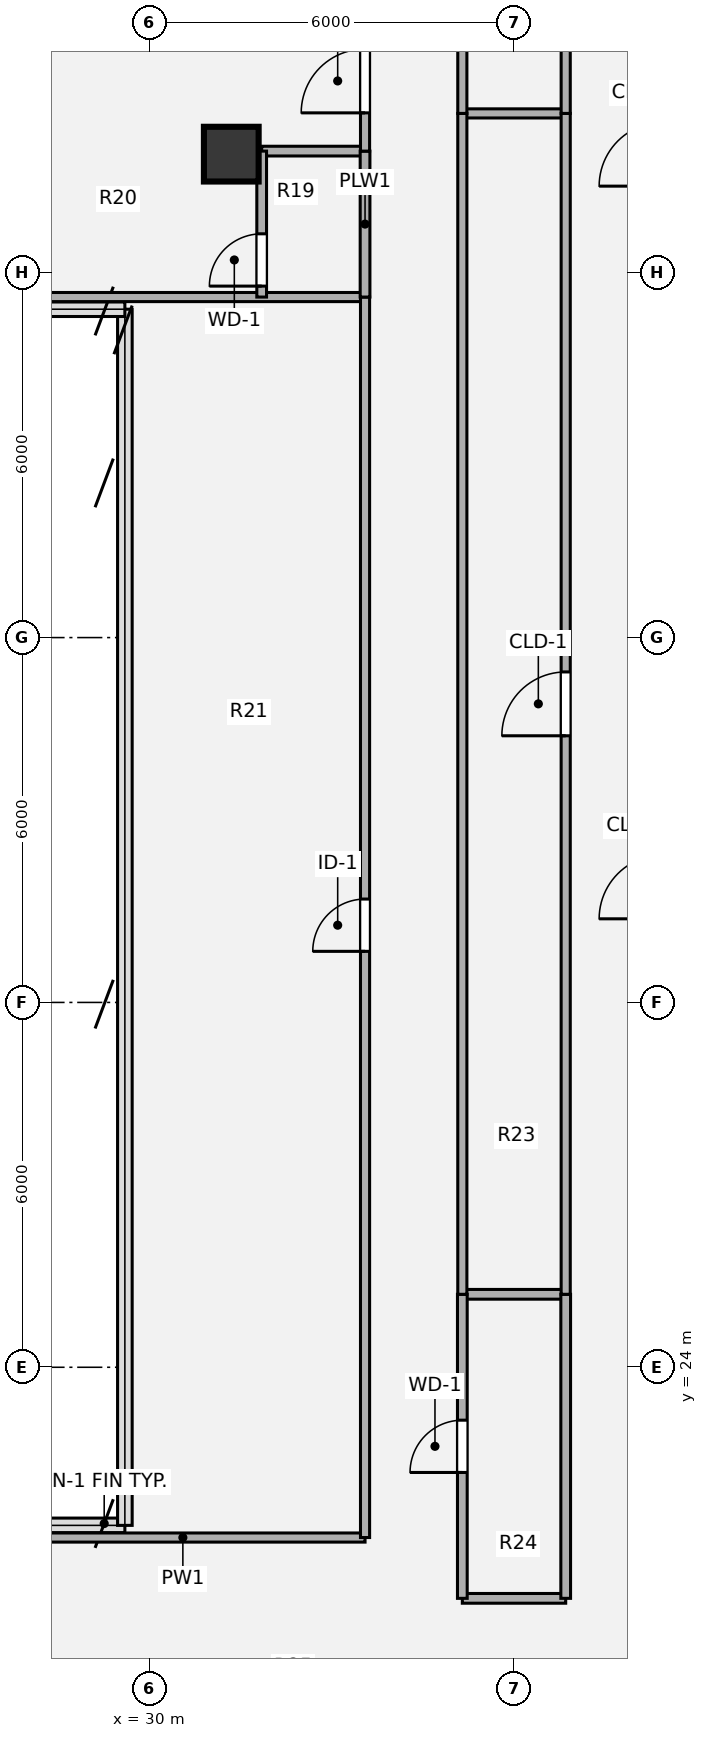
"""IFC4 building model, lengths in metres.
Left out: names, types, materials, properties, quantities, classifications, styles, units other than length and angle.
Written with IfcOpenShell. Run it as: python <this file> out.ifc"""

import sys

from ifc_helpers import new_model, si_unit, direction, frame, frame_2d, origin, origin_2d, place, context, subcontext, project, spatial, rectangle, hollow_circle, extrude, source, transform, mapped, element, fill, save


model = new_model("IFC4")
c1 = context("Model", 3, precision=1e-05, world=origin(), true_north=direction((0.0, 1.0)))
c2 = subcontext(c1, "Body", "Model", "MODEL_VIEW")
j1 = project(units=[si_unit("LENGTHUNIT", "METRE"), si_unit("PLANEANGLEUNIT", "RADIAN")], contexts=[c1])
p1 = place(None, origin())
s1 = spatial("IfcSite", under=j1, at=p1, CompositionType="ELEMENT")
p2 = place(p1, origin())
s2 = spatial("IfcBuilding", under=s1, at=p2, CompositionType="ELEMENT")
p3 = place(p2, frame((0.0, 0.0, 268.38)))
s3 = spatial("IfcBuildingStorey", under=s2, at=p3, CompositionType="ELEMENT", Elevation=268.38)
m1 = source(origin(), c2, "Body", "SweptSolid", [
    extrude(hollow_circle(Radius=0.45, WallThickness=0.032, at=origin_2d()), origin(), (0.0, 0.0, 1.0), 3.78),
])
p4 = place(p3, frame((31.35, 43.95, 0.0), z_axis=(0.0, 0.0, 1.0), x_axis=(1.0, 0.0, 0.0)))
e1 = element("IfcColumn", 1, at=p4, inside=s3, PredefinedType="COLUMN", context=c2, shape_type="MappedRepresentation", body=[
    mapped(m1, transform((0.0, 0.0, 0.0), x_axis=(1.0, 0.0, 0.0), y_axis=(0.0, 1.0, 0.0), z_axis=(0.0, 0.0, 1.0), scale=1.0)),
])
p5 = place(p3, frame((35.15, 20.2, 0.0), z_axis=(0.0, 0.0, 1.0), x_axis=(1.0, 0.0, 0.0)))
e2 = element("IfcWall", 2, at=p5, inside=s3, PredefinedType="PLUMBINGWALL", context=c2, shape_type="SweptSolid", body=[
    extrude(rectangle(XDim=1.7, YDim=0.16, at=frame_2d((0.85, 0.0))), origin(), (0.0, 0.0, 1.0), 3.5),
])
p6 = place(p3, frame((27.558, 21.2, 0.0), z_axis=(0.0, 0.0, 1.0), x_axis=(1.0, 0.0, 0.0)))
e3 = element("IfcWall", 3, at=p6, inside=s3, PredefinedType="PARTITIONING", context=c2, shape_type="SweptSolid", body=[
    extrude(rectangle(XDim=5.992, YDim=0.15, at=frame_2d((2.996, 0.0))), origin(), (0.0, 0.0, 1.0), 3.5),
])
p7 = place(p3, frame((35.15, 25.2, 0.0), z_axis=(0.0, 0.0, 1.0), x_axis=(1.0, 0.0, 0.0)))
e4 = element("IfcWall", 4, at=p7, inside=s3, PredefinedType="PLUMBINGWALL", context=c2, shape_type="SweptSolid", body=[
    extrude(rectangle(XDim=1.7, YDim=0.16, at=frame_2d((0.85, 0.0))), origin(), (0.0, 0.0, 1.0), 3.5),
])
p8 = place(p3, frame((27.558, 41.6, 0.0), z_axis=(0.0, 0.0, 1.0), x_axis=(1.0, 0.0, 0.0)))
e5 = element("IfcWall", 5, at=p8, inside=s3, PredefinedType="PARTITIONING", context=c2, shape_type="SweptSolid", body=[
    extrude(rectangle(XDim=5.992, YDim=0.15, at=frame_2d((2.996, 0.0))), origin(), (0.0, 0.0, 1.0), 3.5),
])
p9 = place(p3, frame((31.85, 44.0, 0.0), z_axis=(0.0, 0.0, 1.0), x_axis=(1.0, 0.0, 0.0)))
e6 = element("IfcWall", 6, at=p9, inside=s3, PredefinedType="PLUMBINGWALL", context=c2, shape_type="SweptSolid", body=[
    extrude(rectangle(XDim=1.7, YDim=0.16, at=frame_2d((0.85, 0.0))), origin(), (0.0, 0.0, 1.0), 2.903),
])
p10 = place(p3, frame((35.15, 44.62, 0.0), z_axis=(0.0, 0.0, 1.0), x_axis=(1.0, 0.0, 0.0)))
e7 = element("IfcWall", 7, at=p10, inside=s3, PredefinedType="PARTITIONING", context=c2, shape_type="SweptSolid", body=[
    extrude(rectangle(XDim=1.7, YDim=0.15, at=frame_2d((0.85, 0.0))), origin(), (0.0, 0.0, 1.0), 3.259),
])
p11 = place(p3, frame((31.85, 41.6, 0.0), z_axis=(0.0, 0.0, 1.0), x_axis=(0.0, 1.0, 0.0)))
e8 = element("IfcWall", 8, at=p11, inside=s3, PredefinedType="PLUMBINGWALL", context=c2, shape_type="SweptSolid", body=[
    extrude(rectangle(XDim=2.4, YDim=0.16, at=frame_2d((1.2, 0.0))), origin(), (0.0, 0.0, 1.0), 3.5),
])
p12 = place(p11, frame((0.18, 0.0, 0.0)))
e9 = element("IfcOpeningElement", 9, at=p12, cuts=e8, PredefinedType="OPENING", context=c2, shape_type="SweptSolid", body=[
    extrude(rectangle(XDim=0.86, YDim=2.1, at=origin_2d()), frame((0.43, 0.09, 1.05), z_axis=(0.0, -1.0, 0.0), x_axis=(1.0, 0.0, 0.0)), (0.0, 0.0, 1.0), 0.18),
])
p13 = place(p3, frame((33.55, 21.2, 0.0), z_axis=(0.0, 0.0, 1.0), x_axis=(0.0, 1.0, 0.0)))
e10 = element("IfcWall", 10, at=p13, inside=s3, PredefinedType="PARTITIONING", context=c2, shape_type="SweptSolid", body=[
    extrude(rectangle(XDim=20.4, YDim=0.15, at=frame_2d((10.2, 0.0))), origin(), (0.0, 0.0, 1.0), 3.5),
])
p14 = place(p13, frame((9.64, 0.0, 0.0)))
e11 = element("IfcOpeningElement", 11, at=p14, cuts=e10, PredefinedType="OPENING", context=c2, shape_type="SweptSolid", body=[
    extrude(rectangle(XDim=0.86, YDim=2.1, at=origin_2d()), frame((0.43, 0.085, 1.05), z_axis=(0.0, -1.0, 0.0), x_axis=(1.0, 0.0, 0.0)), (0.0, 0.0, 1.0), 0.17),
])
p15 = place(p3, frame((33.55, 41.6, 0.0), z_axis=(0.0, 0.0, 1.0), x_axis=(0.0, 1.0, 0.0)))
e12 = element("IfcWall", 12, at=p15, inside=s3, PredefinedType="PLUMBINGWALL", context=c2, shape_type="SweptSolid", body=[
    extrude(rectangle(XDim=2.4, YDim=0.16, at=frame_2d((1.2, 0.0))), origin(), (0.0, 0.0, 1.0), 3.5),
])
p16 = place(p3, frame((33.55, 44.0, 0.0), z_axis=(0.0, 0.0, 1.0), x_axis=(0.0, 1.0, 0.0)))
e13 = element("IfcWall", 13, at=p16, inside=s3, PredefinedType="PARTITIONING", context=c2, shape_type="SweptSolid", body=[
    extrude(rectangle(XDim=2.298, YDim=0.15, at=frame_2d((1.149, 0.0))), origin(), (0.0, 0.0, 1.0), 3.5),
])
p17 = place(p16, frame((0.629, 0.0, 0.0)))
e14 = element("IfcOpeningElement", 14, at=p17, cuts=e13, PredefinedType="OPENING", context=c2, shape_type="SweptSolid", body=[
    extrude(rectangle(XDim=1.05, YDim=2.1, at=origin_2d()), frame((0.525, 0.085, 1.05), z_axis=(0.0, -1.0, 0.0), x_axis=(1.0, 0.0, 0.0)), (0.0, 0.0, 1.0), 0.17),
])
p18 = place(p3, frame((35.15, 20.2, 0.0), z_axis=(0.0, 0.0, 1.0), x_axis=(0.0, 1.0, 0.0)))
e15 = element("IfcWall", 15, at=p18, inside=s3, PredefinedType="PLUMBINGWALL", context=c2, shape_type="SweptSolid", body=[
    extrude(rectangle(XDim=5.0, YDim=0.16, at=frame_2d((2.5, 0.0))), origin(), (0.0, 0.0, 1.0), 3.5),
])
p19 = place(p18, frame((2.07, 0.0, 0.0)))
e16 = element("IfcOpeningElement", 16, at=p19, cuts=e15, PredefinedType="OPENING", context=c2, shape_type="SweptSolid", body=[
    extrude(rectangle(XDim=0.86, YDim=2.1, at=origin_2d()), frame((0.43, 0.09, 1.05), z_axis=(0.0, -1.0, 0.0), x_axis=(1.0, 0.0, 0.0)), (0.0, 0.0, 1.0), 0.18),
])
p20 = place(p3, frame((35.15, 25.2, 0.0), z_axis=(0.0, 0.0, 1.0), x_axis=(0.0, 1.0, 0.0)))
e17 = element("IfcWall", 17, at=p20, inside=s3, PredefinedType="PARTITIONING", context=c2, shape_type="SweptSolid", body=[
    extrude(rectangle(XDim=19.42, YDim=0.15, at=frame_2d((9.71, 0.0))), origin(), (0.0, 0.0, 1.0), 3.5),
])
p21 = place(p3, frame((35.15, 44.62, 0.0), z_axis=(0.0, 0.0, 1.0), x_axis=(0.0, 1.0, 0.0)))
e18 = element("IfcWall", 18, at=p21, inside=s3, PredefinedType="PARTITIONING", context=c2, shape_type="SweptSolid", body=[
    extrude(rectangle(XDim=12.58, YDim=0.15, at=frame_2d((6.29, 0.0))), origin(), (0.0, 0.0, 1.0), 3.5),
])
p22 = place(p21, frame((5.83, 0.0, 0.0)))
e19 = element("IfcOpeningElement", 19, at=p22, cuts=e18, PredefinedType="OPENING", context=c2, shape_type="SweptSolid", body=[
    extrude(rectangle(XDim=0.86, YDim=2.1, at=origin_2d()), frame((0.43, 0.085, 1.05), z_axis=(0.0, -1.0, 0.0), x_axis=(1.0, 0.0, 0.0)), (0.0, 0.0, 1.0), 0.17),
])
p23 = place(p3, frame((36.85, 20.2, 0.0), z_axis=(0.0, 0.0, 1.0), x_axis=(0.0, 1.0, 0.0)))
e20 = element("IfcWall", 20, at=p23, inside=s3, PredefinedType="PLUMBINGWALL", context=c2, shape_type="SweptSolid", body=[
    extrude(rectangle(XDim=5.0, YDim=0.16, at=frame_2d((2.5, 0.0))), origin(), (0.0, 0.0, 1.0), 3.5),
])
p24 = place(p3, frame((36.85, 25.2, 0.0), z_axis=(0.0, 0.0, 1.0), x_axis=(0.0, 1.0, 0.0)))
e21 = element("IfcWall", 21, at=p24, inside=s3, PredefinedType="PARTITIONING", context=c2, shape_type="SweptSolid", body=[
    extrude(rectangle(XDim=19.42, YDim=0.15, at=frame_2d((9.71, 0.0))), origin(), (0.0, 0.0, 1.0), 3.5),
])
p25 = place(p24, frame((9.185, 0.0, 0.0)))
e22 = element("IfcOpeningElement", 22, at=p25, cuts=e21, PredefinedType="OPENING", context=c2, shape_type="SweptSolid", body=[
    extrude(rectangle(XDim=1.05, YDim=2.1, at=origin_2d()), frame((0.525, 0.085, 1.05), z_axis=(0.0, -1.0, 0.0), x_axis=(1.0, 0.0, 0.0)), (0.0, 0.0, 1.0), 0.17),
])
p26 = place(p3, frame((36.85, 44.62, 0.0), z_axis=(0.0, 0.0, 1.0), x_axis=(0.0, 1.0, 0.0)))
e23 = element("IfcWall", 23, at=p26, inside=s3, PredefinedType="PARTITIONING", context=c2, shape_type="SweptSolid", body=[
    extrude(rectangle(XDim=12.58, YDim=0.15, at=frame_2d((6.29, 0.0))), origin(), (0.0, 0.0, 1.0), 3.5),
])
m2 = source(origin(), c2, "Body", "SweptSolid", [
    extrude(rectangle(XDim=0.86, YDim=2.1, at=origin_2d()), frame((0.43, 0.025, 1.05), z_axis=(0.0, -1.0, 0.0), x_axis=(1.0, 0.0, 0.0)), (0.0, 0.0, 1.0), 0.05),
])
p27 = place(p12, origin())
e24 = element("IfcDoor", 24, at=p27, inside=s3, OperationType="SINGLE_SWING_LEFT", PredefinedType="DOOR", context=c2, shape_type="MappedRepresentation", body=[
    mapped(m2, transform((0.0, 0.0, 0.0), x_axis=(1.0, 0.0, 0.0), y_axis=(0.0, 1.0, 0.0), z_axis=(0.0, 0.0, 1.0), scale=1.0)),
])
fill(e9, e24)
m3 = source(origin(), c2, "Body", "SweptSolid", [
    extrude(rectangle(XDim=0.86, YDim=2.1, at=origin_2d()), frame((0.43, 0.025, 1.05), z_axis=(0.0, -1.0, 0.0), x_axis=(1.0, 0.0, 0.0)), (0.0, 0.0, 1.0), 0.05),
])
p28 = place(p14, origin())
e25 = element("IfcDoor", 25, at=p28, inside=s3, OperationType="SINGLE_SWING_LEFT", PredefinedType="DOOR", context=c2, shape_type="MappedRepresentation", body=[
    mapped(m3, transform((0.0, 0.0, 0.0), x_axis=(1.0, 0.0, 0.0), y_axis=(0.0, 1.0, 0.0), z_axis=(0.0, 0.0, 1.0), scale=1.0)),
])
fill(e11, e25)
m4 = source(origin(), c2, "Body", "SweptSolid", [
    extrude(rectangle(XDim=1.05, YDim=2.1, at=origin_2d()), frame((0.525, 0.025, 1.05), z_axis=(0.0, -1.0, 0.0), x_axis=(1.0, 0.0, 0.0)), (0.0, 0.0, 1.0), 0.05),
])
p29 = place(p17, origin())
e26 = element("IfcDoor", 26, at=p29, inside=s3, OperationType="SINGLE_SWING_LEFT", PredefinedType="DOOR", context=c2, shape_type="MappedRepresentation", body=[
    mapped(m4, transform((0.0, 0.0, 0.0), x_axis=(1.0, 0.0, 0.0), y_axis=(0.0, 1.0, 0.0), z_axis=(0.0, 0.0, 1.0), scale=1.0)),
])
fill(e14, e26)
p30 = place(p19, origin())
e27 = element("IfcDoor", 27, at=p30, inside=s3, OperationType="SINGLE_SWING_LEFT", PredefinedType="DOOR", context=c2, shape_type="MappedRepresentation", body=[
    mapped(m2, transform((0.0, 0.0, 0.0), x_axis=(1.0, 0.0, 0.0), y_axis=(0.0, 1.0, 0.0), z_axis=(0.0, 0.0, 1.0), scale=1.0)),
])
fill(e16, e27)
m5 = source(origin(), c2, "Body", "SweptSolid", [
    extrude(rectangle(XDim=1.05, YDim=2.1, at=origin_2d()), frame((0.525, 0.025, 1.05), z_axis=(0.0, -1.0, 0.0), x_axis=(1.0, 0.0, 0.0)), (0.0, 0.0, 1.0), 0.05),
])
p31 = place(p25, origin())
e28 = element("IfcDoor", 28, at=p31, inside=s3, OperationType="SINGLE_SWING_LEFT", PredefinedType="DOOR", context=c2, shape_type="MappedRepresentation", body=[
    mapped(m5, transform((0.0, 0.0, 0.0), x_axis=(1.0, 0.0, 0.0), y_axis=(0.0, 1.0, 0.0), z_axis=(0.0, 0.0, 1.0), scale=1.0)),
])
fill(e22, e28)
save(model, sys.argv[1])
